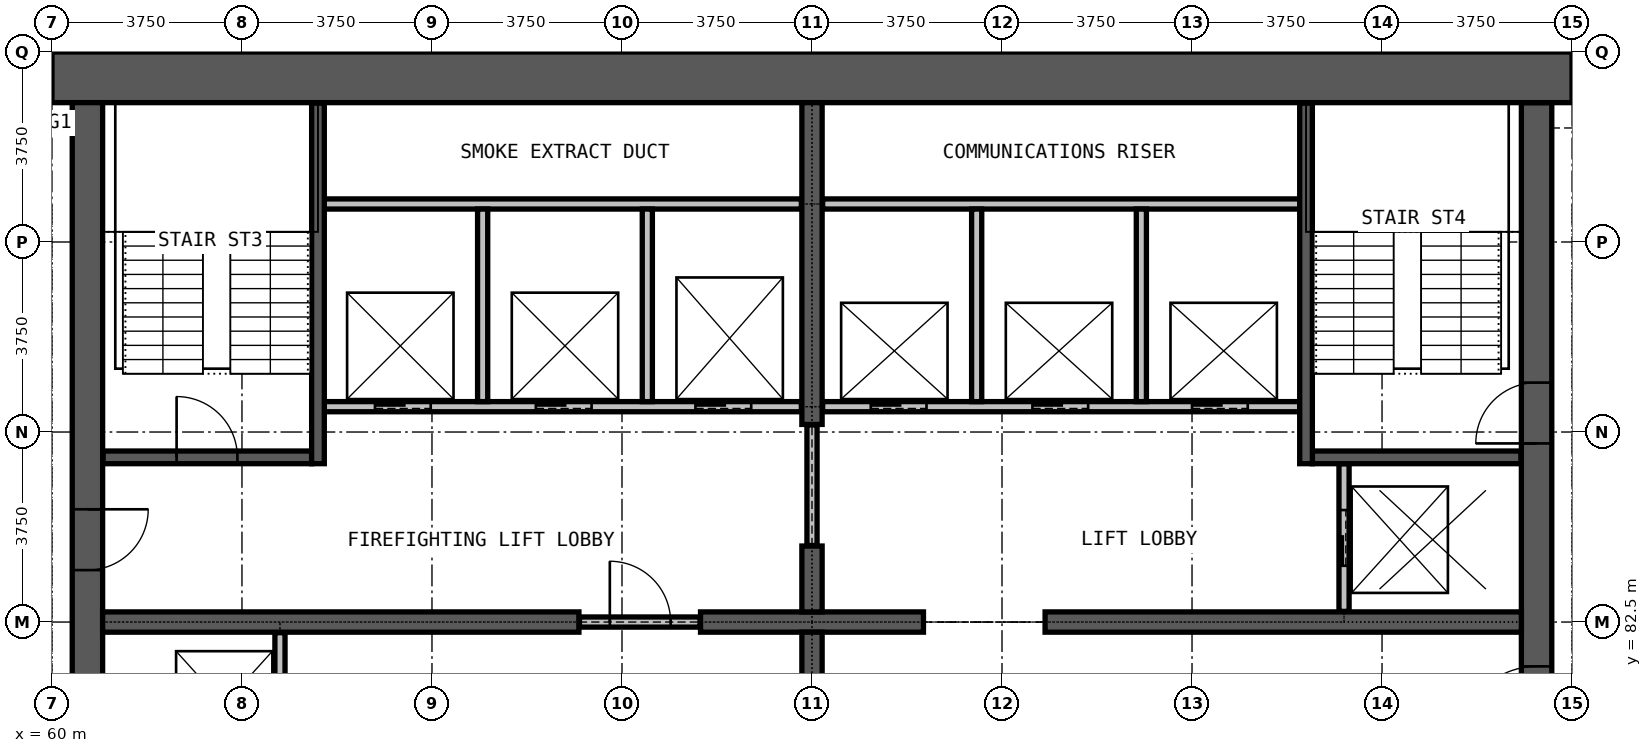
"""IFC4 building model, lengths in metres.
Left out: names, types, materials, properties, quantities, classifications, styles, units other than length and angle.
Written with IfcOpenShell. Run it as: python <this file> out.ifc"""

import sys

from ifc_helpers import new_model, si_unit, direction, frame, frame_2d, origin, place, context, subcontext, project, spatial, rectangle, extrude, element, fill, save


model = new_model("IFC4")
c1 = context("Model", 3, precision=1e-05, world=origin(), true_north=direction((0.0, 1.0)))
c2 = subcontext(c1, "Body", "Model", "MODEL_VIEW")
j1 = project(units=[si_unit("LENGTHUNIT", "METRE"), si_unit("PLANEANGLEUNIT", "RADIAN")], contexts=[c1])
p1 = place(None, origin())
s1 = spatial("IfcSite", under=j1, at=p1, CompositionType="ELEMENT")
p2 = place(p1, origin())
s2 = spatial("IfcBuilding", under=s1, at=p2, CompositionType="ELEMENT")
p3 = place(p2, frame((0.0, 0.0, 195.9)))
s3 = spatial("IfcBuildingStorey", under=s2, at=p3, CompositionType="ELEMENT", Elevation=195.9)
p4 = place(p3, frame((89.3, 72.25, 0.0), z_axis=(0.0, 0.0, 1.0), x_axis=(0.0, 1.0, 0.0)))
e1 = element("IfcWall", 1, at=p4, inside=s3, PredefinedType="SHEAR", context=c2, shape_type="SweptSolid", body=[
    extrude(rectangle(XDim=20.5, YDim=0.6, at=frame_2d((10.25, 0.0))), origin(), (0.0, 0.0, 1.0), 3.6),
])
p5 = place(p4, frame((0.275, 0.0, 0.0)))
e2 = element("IfcOpeningElement", 2, at=p5, cuts=e1, PredefinedType="OPENING", context=c2, shape_type="SweptSolid", body=[
    extrude(rectangle(XDim=1.2, YDim=2.2, at=frame_2d((0.6, 1.1))), frame((0.0, 0.31, 0.0), z_axis=(0.0, -1.0, 0.0), x_axis=(1.0, 0.0, 0.0)), (0.0, 0.0, 1.0), 0.62),
])
p6 = place(p4, frame((13.775, 0.0, 0.0)))
e3 = element("IfcOpeningElement", 3, at=p6, cuts=e1, PredefinedType="OPENING", context=c2, shape_type="SweptSolid", body=[
    extrude(rectangle(XDim=1.2, YDim=2.2, at=frame_2d((0.6, 1.1))), frame((0.0, 0.31, 0.0), z_axis=(0.0, -1.0, 0.0), x_axis=(1.0, 0.0, 0.0)), (0.0, 0.0, 1.0), 0.62),
])
p7 = place(p4, frame((7.875, 0.0, 0.0)))
e4 = element("IfcOpeningElement", 4, at=p7, cuts=e1, PredefinedType="OPENING", context=c2, shape_type="SweptSolid", body=[
    extrude(rectangle(XDim=1.5, YDim=2.2, at=frame_2d((0.75, 1.1))), frame((0.0, 0.31, 0.0), z_axis=(0.0, -1.0, 0.0), x_axis=(1.0, 0.0, 0.0)), (0.0, 0.0, 1.0), 0.62),
])
p8 = place(p3, frame((90.0, 93.25, 0.0), z_axis=(0.0, 0.0, 1.0), x_axis=(-1.0, 0.0, 0.0)))
e5 = element("IfcWall", 5, at=p8, inside=s3, PredefinedType="SHEAR", context=c2, shape_type="SweptSolid", body=[
    extrude(rectangle(XDim=30.0, YDim=1.0, at=frame_2d((15.0, 0.0))), origin(), (0.0, 0.0, 1.0), 3.6),
])
p9 = place(p3, frame((60.7, 92.75, 0.0), z_axis=(0.0, 0.0, 1.0), x_axis=(0.0, -1.0, 0.0)))
e6 = element("IfcWall", 6, at=p9, inside=s3, PredefinedType="SHEAR", context=c2, shape_type="SweptSolid", body=[
    extrude(rectangle(XDim=20.5, YDim=0.6, at=frame_2d((10.25, 0.0))), origin(), (0.0, 0.0, 1.0), 3.6),
])
p10 = place(p9, frame((19.025, 0.0, 0.0)))
e7 = element("IfcOpeningElement", 7, at=p10, cuts=e6, PredefinedType="OPENING", context=c2, shape_type="SweptSolid", body=[
    extrude(rectangle(XDim=1.2, YDim=2.2, at=frame_2d((0.6, 1.1))), frame((0.0, 0.31, 0.0), z_axis=(0.0, -1.0, 0.0), x_axis=(1.0, 0.0, 0.0)), (0.0, 0.0, 1.0), 0.62),
])
p11 = place(p9, frame((8.025, 0.0, 0.0)))
e8 = element("IfcOpeningElement", 8, at=p11, cuts=e6, PredefinedType="OPENING", context=c2, shape_type="SweptSolid", body=[
    extrude(rectangle(XDim=1.2, YDim=2.2, at=frame_2d((0.6, 1.1))), frame((0.0, 0.31, 0.0), z_axis=(0.0, -1.0, 0.0), x_axis=(1.0, 0.0, 0.0)), (0.0, 0.0, 1.0), 0.62),
])
p12 = place(p3, frame((61.0, 82.5, 0.0), z_axis=(0.0, 0.0, 1.0), x_axis=(1.0, 0.0, 0.0)))
e9 = element("IfcWall", 9, at=p12, inside=s3, PredefinedType="SHEAR", context=c2, shape_type="SweptSolid", body=[
    extrude(rectangle(XDim=9.4, YDim=0.4, at=frame_2d((4.7, 0.0))), origin(), (0.0, 0.0, 1.0), 3.6),
])
p13 = place(p3, frame((72.8, 82.5, 0.0), z_axis=(0.0, 0.0, 1.0), x_axis=(1.0, 0.0, 0.0)))
e10 = element("IfcWall", 10, at=p13, inside=s3, PredefinedType="SHEAR", context=c2, shape_type="SweptSolid", body=[
    extrude(rectangle(XDim=4.4, YDim=0.4, at=frame_2d((2.2, 0.0))), origin(), (0.0, 0.0, 1.0), 3.6),
])
p14 = place(p3, frame((79.6, 82.5, 0.0), z_axis=(0.0, 0.0, 1.0), x_axis=(1.0, 0.0, 0.0)))
e11 = element("IfcWall", 11, at=p14, inside=s3, PredefinedType="SHEAR", context=c2, shape_type="SweptSolid", body=[
    extrude(rectangle(XDim=9.4, YDim=0.4, at=frame_2d((4.7, 0.0))), origin(), (0.0, 0.0, 1.0), 3.6),
])
for number, where, z_axis, x_axis in (
    (12, (75.0, 81.0, 0.0), (0.0, 0.0, 1.0), (0.0, 1.0, 0.0)),
    (13, (75.0, 82.7, 0.0), (0.0, 0.0, 1.0), (0.0, 1.0, 0.0)),
):
    element("IfcWall", number, at=place(p3, frame(where, z_axis=z_axis, x_axis=x_axis)), inside=s3, PredefinedType="SHEAR", context=c2, shape_type="SweptSolid", body=[
        extrude(rectangle(XDim=1.3, YDim=0.4, at=frame_2d((0.65, 0.0))), origin(), (0.0, 0.0, 1.0), 3.6),
    ])
p15 = place(p3, frame((75.0, 86.4, 0.0), z_axis=(0.0, 0.0, 1.0), x_axis=(0.0, 1.0, 0.0)))
e14 = element("IfcWall", 14, at=p15, inside=s3, PredefinedType="SHEAR", context=c2, shape_type="SweptSolid", body=[
    extrude(rectangle(XDim=6.35, YDim=0.4, at=frame_2d((3.175, 0.0))), origin(), (0.0, 0.0, 1.0), 3.6),
])
p16 = place(p3, frame((70.41, 82.5, 0.0), z_axis=(0.0, 0.0, 1.0), x_axis=(1.0, 0.0, 0.0)))
e15 = element("IfcWall", 15, at=p16, inside=s3, PredefinedType="PARTITIONING", context=c2, shape_type="SweptSolid", body=[
    extrude(rectangle(XDim=2.38, YDim=0.2, at=frame_2d((1.19, 0.0))), origin(), (0.0, 0.0, 1.0), 2.4),
])
p17 = place(p16, frame((0.6, 0.0, 0.0)))
e16 = element("IfcOpeningElement", 16, at=p17, cuts=e15, PredefinedType="OPENING", context=c2, shape_type="SweptSolid", body=[
    extrude(rectangle(XDim=1.2, YDim=2.2, at=frame_2d((0.6, 1.1))), frame((0.0, 0.11, 0.0), z_axis=(0.0, -1.0, 0.0), x_axis=(1.0, 0.0, 0.0)), (0.0, 0.0, 1.0), 0.22),
])
p18 = place(p3, frame((75.0, 84.01, 0.0), z_axis=(0.0, 0.0, 1.0), x_axis=(0.0, 1.0, 0.0)))
e17 = element("IfcWall", 17, at=p18, inside=s3, PredefinedType="PARTITIONING", context=c2, shape_type="SweptSolid", body=[
    extrude(rectangle(XDim=2.38, YDim=0.2, at=frame_2d((1.19, 0.0))), origin(), (0.0, 0.0, 1.0), 2.4),
])
p19 = place(p3, frame((65.375, 86.75, 0.0), z_axis=(0.0, 0.0, 1.0), x_axis=(1.0, 0.0, 0.0)))
e18 = element("IfcWall", 18, at=p19, inside=s3, PredefinedType="PARTITIONING", context=c2, shape_type="SweptSolid", body=[
    extrude(rectangle(XDim=9.415, YDim=0.2, at=frame_2d((4.708, 0.0))), origin(), (0.0, 0.0, 1.0), 3.3),
])
p20 = place(p19, frame((1.0, 0.0, 0.0)))
e19 = element("IfcOpeningElement", 19, at=p20, cuts=e18, PredefinedType="OPENING", context=c2, shape_type="SweptSolid", body=[
    extrude(rectangle(XDim=1.1, YDim=2.2, at=frame_2d((0.55, 1.1))), frame((0.0, 0.11, 0.0), z_axis=(0.0, -1.0, 0.0), x_axis=(1.0, 0.0, 0.0)), (0.0, 0.0, 1.0), 0.22),
])
p21 = place(p19, frame((4.175, 0.0, 0.0)))
e20 = element("IfcOpeningElement", 20, at=p21, cuts=e18, PredefinedType="OPENING", context=c2, shape_type="SweptSolid", body=[
    extrude(rectangle(XDim=1.1, YDim=2.2, at=frame_2d((0.55, 1.1))), frame((0.0, 0.11, 0.0), z_axis=(0.0, -1.0, 0.0), x_axis=(1.0, 0.0, 0.0)), (0.0, 0.0, 1.0), 0.22),
])
p22 = place(p19, frame((7.325, 0.0, 0.0)))
e21 = element("IfcOpeningElement", 21, at=p22, cuts=e18, PredefinedType="OPENING", context=c2, shape_type="SweptSolid", body=[
    extrude(rectangle(XDim=1.1, YDim=2.2, at=frame_2d((0.55, 1.1))), frame((0.0, 0.11, 0.0), z_axis=(0.0, -1.0, 0.0), x_axis=(1.0, 0.0, 0.0)), (0.0, 0.0, 1.0), 0.22),
])
p23 = place(p3, frame((75.21, 86.75, 0.0), z_axis=(0.0, 0.0, 1.0), x_axis=(1.0, 0.0, 0.0)))
e22 = element("IfcWall", 22, at=p23, inside=s3, PredefinedType="PARTITIONING", context=c2, shape_type="SweptSolid", body=[
    extrude(rectangle(XDim=9.415, YDim=0.2, at=frame_2d((4.708, 0.0))), origin(), (0.0, 0.0, 1.0), 3.3),
])
p24 = place(p23, frame((0.95, 0.0, 0.0)))
e23 = element("IfcOpeningElement", 23, at=p24, cuts=e22, PredefinedType="OPENING", context=c2, shape_type="SweptSolid", body=[
    extrude(rectangle(XDim=1.1, YDim=2.2, at=frame_2d((0.55, 1.1))), frame((0.0, 0.11, 0.0), z_axis=(0.0, -1.0, 0.0), x_axis=(1.0, 0.0, 0.0)), (0.0, 0.0, 1.0), 0.22),
])
p25 = place(p23, frame((4.14, 0.0, 0.0)))
e24 = element("IfcOpeningElement", 24, at=p25, cuts=e22, PredefinedType="OPENING", context=c2, shape_type="SweptSolid", body=[
    extrude(rectangle(XDim=1.1, YDim=2.2, at=frame_2d((0.55, 1.1))), frame((0.0, 0.11, 0.0), z_axis=(0.0, -1.0, 0.0), x_axis=(1.0, 0.0, 0.0)), (0.0, 0.0, 1.0), 0.22),
])
p26 = place(p23, frame((7.29, 0.0, 0.0)))
e25 = element("IfcOpeningElement", 25, at=p26, cuts=e22, PredefinedType="OPENING", context=c2, shape_type="SweptSolid", body=[
    extrude(rectangle(XDim=1.1, YDim=2.2, at=frame_2d((0.55, 1.1))), frame((0.0, 0.11, 0.0), z_axis=(0.0, -1.0, 0.0), x_axis=(1.0, 0.0, 0.0)), (0.0, 0.0, 1.0), 0.22),
])
for number, where, z_axis, x_axis in (
    (26, (65.375, 90.75, 0.0), (0.0, 0.0, 1.0), (1.0, 0.0, 0.0)),
    (27, (75.21, 90.75, 0.0), (0.0, 0.0, 1.0), (1.0, 0.0, 0.0)),
):
    element("IfcWall", number, at=place(p3, frame(where, z_axis=z_axis, x_axis=x_axis)), inside=s3, PredefinedType="PARTITIONING", context=c2, shape_type="SweptSolid", body=[
        extrude(rectangle(XDim=9.415, YDim=0.2, at=frame_2d((4.708, 0.0))), origin(), (0.0, 0.0, 1.0), 3.3),
    ])
p27 = place(p3, frame((64.5, 79.375, 0.0), z_axis=(0.0, 0.0, 1.0), x_axis=(0.0, 1.0, 0.0)))
e28 = element("IfcWall", 28, at=p27, inside=s3, PredefinedType="PARTITIONING", context=c2, shape_type="SweptSolid", body=[
    extrude(rectangle(XDim=2.915, YDim=0.2, at=frame_2d((1.458, 0.0))), origin(), (0.0, 0.0, 1.0), 3.3),
])
for number, where, z_axis, x_axis in (
    (29, (68.5, 86.85, 0.0), (0.0, 0.0, 1.0), (0.0, 1.0, 0.0)),
    (30, (71.75, 86.85, 0.0), (0.0, 0.0, 1.0), (0.0, 1.0, 0.0)),
    (31, (78.25, 86.85, 0.0), (0.0, 0.0, 1.0), (0.0, 1.0, 0.0)),
    (32, (81.5, 86.85, 0.0), (0.0, 0.0, 1.0), (0.0, 1.0, 0.0)),
):
    element("IfcWall", number, at=place(p3, frame(where, z_axis=z_axis, x_axis=x_axis)), inside=s3, PredefinedType="PARTITIONING", context=c2, shape_type="SweptSolid", body=[
        extrude(rectangle(XDim=3.8, YDim=0.2, at=frame_2d((1.9, 0.0))), origin(), (0.0, 0.0, 1.0), 3.3),
    ])
p28 = place(p3, frame((85.5, 82.71, 0.0), z_axis=(0.0, 0.0, 1.0), x_axis=(0.0, 1.0, 0.0)))
e33 = element("IfcWall", 33, at=p28, inside=s3, PredefinedType="PARTITIONING", context=c2, shape_type="SweptSolid", body=[
    extrude(rectangle(XDim=2.915, YDim=0.2, at=frame_2d((1.458, 0.0))), origin(), (0.0, 0.0, 1.0), 3.3),
])
p29 = place(p28, frame((0.9, 0.0, 0.0)))
e34 = element("IfcOpeningElement", 34, at=p29, cuts=e33, PredefinedType="OPENING", context=c2, shape_type="SweptSolid", body=[
    extrude(rectangle(XDim=1.1, YDim=2.2, at=frame_2d((0.55, 1.1))), frame((0.0, 0.11, 0.0), z_axis=(0.0, -1.0, 0.0), x_axis=(1.0, 0.0, 0.0)), (0.0, 0.0, 1.0), 0.22),
])
p30 = place(p3, frame((61.01, 85.75, 0.0), z_axis=(0.0, 0.0, 1.0), x_axis=(1.0, 0.0, 0.0)))
e35 = element("IfcWall", 35, at=p30, inside=s3, PredefinedType="PARTITIONING", context=c2, shape_type="SweptSolid", body=[
    extrude(rectangle(XDim=4.115, YDim=0.25, at=frame_2d((2.058, 0.0))), origin(), (0.0, 0.0, 1.0), 3.3),
])
p31 = place(p30, frame((1.45, 0.0, 0.0)))
e36 = element("IfcOpeningElement", 36, at=p31, cuts=e35, PredefinedType="OPENING", context=c2, shape_type="SweptSolid", body=[
    extrude(rectangle(XDim=1.2, YDim=2.2, at=frame_2d((0.6, 1.1))), frame((0.0, 0.135, 0.0), z_axis=(0.0, -1.0, 0.0), x_axis=(1.0, 0.0, 0.0)), (0.0, 0.0, 1.0), 0.27),
])
p32 = place(p3, frame((84.875, 85.75, 0.0), z_axis=(0.0, 0.0, 1.0), x_axis=(1.0, 0.0, 0.0)))
e37 = element("IfcWall", 37, at=p32, inside=s3, PredefinedType="PARTITIONING", context=c2, shape_type="SweptSolid", body=[
    extrude(rectangle(XDim=4.115, YDim=0.25, at=frame_2d((2.058, 0.0))), origin(), (0.0, 0.0, 1.0), 3.3),
])
for number, where, z_axis, x_axis in (
    (38, (65.25, 85.625, 0.0), (0.0, 0.0, 1.0), (0.0, 1.0, 0.0)),
    (39, (84.75, 85.625, 0.0), (0.0, 0.0, 1.0), (0.0, 1.0, 0.0)),
):
    element("IfcWall", number, at=place(p3, frame(where, z_axis=z_axis, x_axis=x_axis)), inside=s3, PredefinedType="PARTITIONING", context=c2, shape_type="SweptSolid", body=[
        extrude(rectangle(XDim=7.115, YDim=0.25, at=frame_2d((3.558, 0.0))), origin(), (0.0, 0.0, 1.0), 3.3),
    ])
p33 = place(p24, origin())
e40 = element("IfcDoor", 40, at=p33, inside=s3, OperationType="DOUBLE_DOOR_SLIDING", PredefinedType="DOOR", context=c2, shape_type="SweptSolid", body=[
    extrude(rectangle(XDim=1.1, YDim=2.2, at=frame_2d((0.55, 1.1))), frame((0.0, 0.025, 0.0), z_axis=(0.0, -1.0, 0.0), x_axis=(1.0, 0.0, 0.0)), (0.0, 0.0, 1.0), 0.05),
])
fill(e23, e40)
p34 = place(p25, origin())
e41 = element("IfcDoor", 41, at=p34, inside=s3, OperationType="DOUBLE_DOOR_SLIDING", PredefinedType="DOOR", context=c2, shape_type="SweptSolid", body=[
    extrude(rectangle(XDim=1.1, YDim=2.2, at=frame_2d((0.55, 1.1))), frame((0.0, 0.025, 0.0), z_axis=(0.0, -1.0, 0.0), x_axis=(1.0, 0.0, 0.0)), (0.0, 0.0, 1.0), 0.05),
])
fill(e24, e41)
p35 = place(p26, origin())
e42 = element("IfcDoor", 42, at=p35, inside=s3, OperationType="DOUBLE_DOOR_SLIDING", PredefinedType="DOOR", context=c2, shape_type="SweptSolid", body=[
    extrude(rectangle(XDim=1.1, YDim=2.2, at=frame_2d((0.55, 1.1))), frame((0.0, 0.025, 0.0), z_axis=(0.0, -1.0, 0.0), x_axis=(1.0, 0.0, 0.0)), (0.0, 0.0, 1.0), 0.05),
])
fill(e25, e42)
p36 = place(p20, origin())
e43 = element("IfcDoor", 43, at=p36, inside=s3, OperationType="DOUBLE_DOOR_SLIDING", PredefinedType="DOOR", context=c2, shape_type="SweptSolid", body=[
    extrude(rectangle(XDim=1.1, YDim=2.2, at=frame_2d((0.55, 1.1))), frame((0.0, 0.025, 0.0), z_axis=(0.0, -1.0, 0.0), x_axis=(1.0, 0.0, 0.0)), (0.0, 0.0, 1.0), 0.05),
])
fill(e19, e43)
p37 = place(p21, origin())
e44 = element("IfcDoor", 44, at=p37, inside=s3, OperationType="DOUBLE_DOOR_SLIDING", PredefinedType="DOOR", context=c2, shape_type="SweptSolid", body=[
    extrude(rectangle(XDim=1.1, YDim=2.2, at=frame_2d((0.55, 1.1))), frame((0.0, 0.025, 0.0), z_axis=(0.0, -1.0, 0.0), x_axis=(1.0, 0.0, 0.0)), (0.0, 0.0, 1.0), 0.05),
])
fill(e20, e44)
p38 = place(p22, origin())
e45 = element("IfcDoor", 45, at=p38, inside=s3, OperationType="DOUBLE_DOOR_SLIDING", PredefinedType="DOOR", context=c2, shape_type="SweptSolid", body=[
    extrude(rectangle(XDim=1.1, YDim=2.2, at=frame_2d((0.55, 1.1))), frame((0.0, 0.025, 0.0), z_axis=(0.0, -1.0, 0.0), x_axis=(1.0, 0.0, 0.0)), (0.0, 0.0, 1.0), 0.05),
])
fill(e21, e45)
p39 = place(p29, origin())
e46 = element("IfcDoor", 46, at=p39, inside=s3, OperationType="DOUBLE_DOOR_SLIDING", PredefinedType="DOOR", context=c2, shape_type="SweptSolid", body=[
    extrude(rectangle(XDim=1.1, YDim=2.2, at=frame_2d((0.55, 1.1))), frame((0.0, 0.025, 0.0), z_axis=(0.0, -1.0, 0.0), x_axis=(1.0, 0.0, 0.0)), (0.0, 0.0, 1.0), 0.05),
])
fill(e34, e46)
p40 = place(p17, origin())
e47 = element("IfcDoor", 47, at=p40, inside=s3, OperationType="SINGLE_SWING_RIGHT", PredefinedType="DOOR", context=c2, shape_type="SweptSolid", body=[
    extrude(rectangle(XDim=1.2, YDim=2.2, at=frame_2d((0.6, 1.1))), frame((0.0, 0.025, 0.0), z_axis=(0.0, -1.0, 0.0), x_axis=(1.0, 0.0, 0.0)), (0.0, 0.0, 1.0), 0.05),
])
fill(e16, e47)
p41 = place(p31, origin())
e48 = element("IfcDoor", 48, at=p41, inside=s3, OperationType="SINGLE_SWING_LEFT", PredefinedType="DOOR", context=c2, shape_type="SweptSolid", body=[
    extrude(rectangle(XDim=1.2, YDim=2.2, at=frame_2d((0.6, 1.1))), frame((0.0, 0.025, 0.0), z_axis=(0.0, -1.0, 0.0), x_axis=(1.0, 0.0, 0.0)), (0.0, 0.0, 1.0), 0.05),
])
fill(e36, e48)
p42 = place(p6, origin())
e49 = element("IfcDoor", 49, at=p42, inside=s3, OperationType="SINGLE_SWING_RIGHT", PredefinedType="DOOR", context=c2, shape_type="SweptSolid", body=[
    extrude(rectangle(XDim=1.2, YDim=2.2, at=frame_2d((0.6, 1.1))), frame((0.0, 0.025, 0.0), z_axis=(0.0, -1.0, 0.0), x_axis=(1.0, 0.0, 0.0)), (0.0, 0.0, 1.0), 0.05),
])
fill(e3, e49)
p43 = place(p7, origin())
e50 = element("IfcDoor", 50, at=p43, inside=s3, OperationType="DOUBLE_DOOR_SINGLE_SWING", PredefinedType="DOOR", context=c2, shape_type="SweptSolid", body=[
    extrude(rectangle(XDim=1.5, YDim=2.2, at=frame_2d((0.75, 1.1))), frame((0.0, 0.025, 0.0), z_axis=(0.0, -1.0, 0.0), x_axis=(1.0, 0.0, 0.0)), (0.0, 0.0, 1.0), 0.05),
])
fill(e4, e50)
p44 = place(p11, origin())
e51 = element("IfcDoor", 51, at=p44, inside=s3, OperationType="SINGLE_SWING_LEFT", PredefinedType="DOOR", context=c2, shape_type="SweptSolid", body=[
    extrude(rectangle(XDim=1.2, YDim=2.2, at=frame_2d((0.6, 1.1))), frame((0.0, 0.025, 0.0), z_axis=(0.0, -1.0, 0.0), x_axis=(1.0, 0.0, 0.0)), (0.0, 0.0, 1.0), 0.05),
])
fill(e8, e51)
save(model, sys.argv[1])
